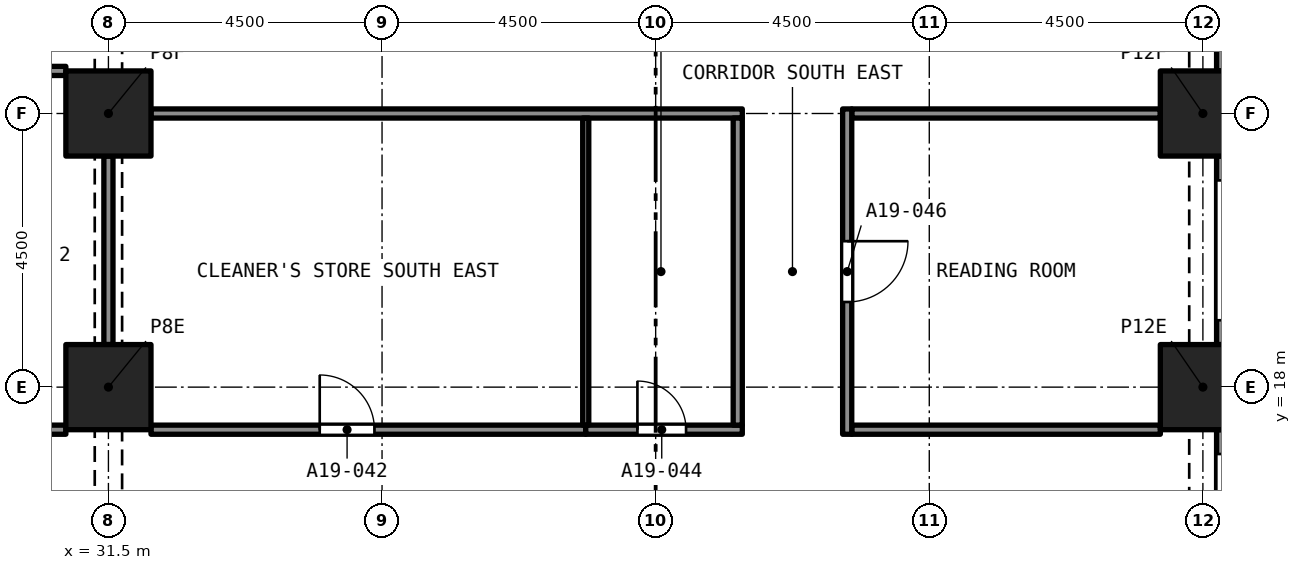
"""IFC4 building model, lengths in metres.
Left out: names, types, materials, properties, quantities, classifications, styles, units other than length and angle.
Written with IfcOpenShell. Run it as: python <this file> out.ifc"""

import sys

from ifc_helpers import new_model, si_unit, direction, frame, frame_2d, origin, origin_2d, place, context, subcontext, project, spatial, rectangle, extrude, element, fill, save


model = new_model("IFC4")
c1 = context("Model", 3, precision=1e-05, world=origin(), true_north=direction((0.0, 1.0)))
c2 = subcontext(c1, "Body", "Model", "MODEL_VIEW")
j1 = project(units=[si_unit("LENGTHUNIT", "METRE"), si_unit("PLANEANGLEUNIT", "RADIAN")], contexts=[c1])
p1 = place(None, origin())
s1 = spatial("IfcSite", under=j1, at=p1, CompositionType="ELEMENT")
p2 = place(p1, origin())
s2 = spatial("IfcBuilding", under=s1, at=p2, CompositionType="ELEMENT")
p3 = place(p2, frame((0.0, 0.0, 72.0)))
s3 = spatial("IfcBuildingStorey", under=s2, at=p3, CompositionType="ELEMENT", Elevation=72.0)
for number, where, z_axis, x_axis in (
    (1, (31.5, 18.0, 0.0), (0.0, 0.0, 1.0), (1.0, 0.0, 0.0)),
    (2, (49.5, 18.0, 0.0), (0.0, 0.0, 1.0), (1.0, 0.0, 0.0)),
    (3, (31.5, 22.5, 0.0), (0.0, 0.0, 1.0), (1.0, 0.0, 0.0)),
    (4, (49.5, 22.5, 0.0), (0.0, 0.0, 1.0), (1.0, 0.0, 0.0)),
):
    element("IfcColumn", number, at=place(p3, frame(where, z_axis=z_axis, x_axis=x_axis)), inside=s3, PredefinedType="COLUMN", context=c2, shape_type="SweptSolid", body=[
        extrude(rectangle(XDim=1.4, YDim=1.4, at=origin_2d()), origin(), (0.0, 0.0, 1.0), 3.2),
    ])
p4 = place(p3, frame((49.875, 17.3, 0.0), z_axis=(0.0, 0.0, 1.0), x_axis=(0.0, -1.0, 0.0)))
e5 = element("IfcWall", 5, at=p4, inside=s3, PredefinedType="SOLIDWALL", context=c2, shape_type="SweptSolid", body=[
    extrude(rectangle(XDim=3.1, YDim=0.3, at=frame_2d((1.55, 0.0))), origin(), (0.0, 0.0, 1.0), 3.2),
])
p5 = place(p4, frame((0.4, 0.0, 0.45)))
e6 = element("IfcOpeningElement", 6, at=p5, cuts=e5, PredefinedType="OPENING", context=c2, shape_type="SweptSolid", body=[
    extrude(rectangle(XDim=2.3, YDim=1.95, at=frame_2d((1.15, 0.975))), frame((0.0, 0.16, 0.0), z_axis=(0.0, -1.0, 0.0), x_axis=(1.0, 0.0, 0.0)), (0.0, 0.0, 1.0), 0.32),
])
p6 = place(p3, frame((49.875, 21.8, 0.0), z_axis=(0.0, 0.0, 1.0), x_axis=(0.0, -1.0, 0.0)))
e7 = element("IfcWall", 7, at=p6, inside=s3, PredefinedType="SOLIDWALL", context=c2, shape_type="SweptSolid", body=[
    extrude(rectangle(XDim=3.1, YDim=0.3, at=frame_2d((1.55, 0.0))), origin(), (0.0, 0.0, 1.0), 3.2),
])
p7 = place(p6, frame((0.4, 0.0, 0.45)))
e8 = element("IfcOpeningElement", 8, at=p7, cuts=e7, PredefinedType="OPENING", context=c2, shape_type="SweptSolid", body=[
    extrude(rectangle(XDim=2.3, YDim=1.95, at=frame_2d((1.15, 0.975))), frame((0.0, 0.16, 0.0), z_axis=(0.0, -1.0, 0.0), x_axis=(1.0, 0.0, 0.0)), (0.0, 0.0, 1.0), 0.32),
])
p8 = place(p3, frame((49.875, 26.3, 0.0), z_axis=(0.0, 0.0, 1.0), x_axis=(0.0, -1.0, 0.0)))
e9 = element("IfcWall", 9, at=p8, inside=s3, PredefinedType="SOLIDWALL", context=c2, shape_type="SweptSolid", body=[
    extrude(rectangle(XDim=3.1, YDim=0.3, at=frame_2d((1.55, 0.0))), origin(), (0.0, 0.0, 1.0), 3.2),
])
p9 = place(p8, frame((0.4, 0.0, 0.45)))
e10 = element("IfcOpeningElement", 10, at=p9, cuts=e9, PredefinedType="OPENING", context=c2, shape_type="SweptSolid", body=[
    extrude(rectangle(XDim=2.3, YDim=1.95, at=frame_2d((1.15, 0.975))), frame((0.0, 0.16, 0.0), z_axis=(0.0, -1.0, 0.0), x_axis=(1.0, 0.0, 0.0)), (0.0, 0.0, 1.0), 0.32),
])
p10 = place(p3, frame((25.725, 17.3, 0.0), z_axis=(0.0, 0.0, 1.0), x_axis=(1.0, 0.0, 0.0)))
e11 = element("IfcWall", 11, at=p10, inside=s3, PredefinedType="PARTITIONING", context=c2, shape_type="SweptSolid", body=[
    extrude(rectangle(XDim=5.075, YDim=0.15, at=frame_2d((2.538, 0.0))), origin(), (0.0, 0.0, 1.0), 2.7),
])
p11 = place(p3, frame((32.2, 17.3, 0.0), z_axis=(0.0, 0.0, 1.0), x_axis=(1.0, 0.0, 0.0)))
e12 = element("IfcWall", 12, at=p11, inside=s3, PredefinedType="PARTITIONING", context=c2, shape_type="SweptSolid", body=[
    extrude(rectangle(XDim=7.15, YDim=0.15, at=frame_2d((3.575, 0.0))), origin(), (0.0, 0.0, 1.0), 2.7),
])
p12 = place(p11, frame((2.775, 0.0, 0.0)))
e13 = element("IfcOpeningElement", 13, at=p12, cuts=e12, PredefinedType="OPENING", context=c2, shape_type="SweptSolid", body=[
    extrude(rectangle(XDim=0.9, YDim=2.1, at=frame_2d((0.45, 1.05))), frame((0.0, 0.085, 0.0), z_axis=(0.0, -1.0, 0.0), x_axis=(1.0, 0.0, 0.0)), (0.0, 0.0, 1.0), 0.17),
])
p13 = place(p3, frame((39.35, 17.3, 0.0), z_axis=(0.0, 0.0, 1.0), x_axis=(1.0, 0.0, 0.0)))
e14 = element("IfcWall", 14, at=p13, inside=s3, PredefinedType="PARTITIONING", context=c2, shape_type="SweptSolid", body=[
    extrude(rectangle(XDim=2.575, YDim=0.15, at=frame_2d((1.288, 0.0))), origin(), (0.0, 0.0, 1.0), 2.7),
])
p14 = place(p13, frame((0.85, 0.0, 0.0)))
e15 = element("IfcOpeningElement", 15, at=p14, cuts=e14, PredefinedType="OPENING", context=c2, shape_type="SweptSolid", body=[
    extrude(rectangle(XDim=0.8, YDim=2.1, at=frame_2d((0.4, 1.05))), frame((0.0, 0.085, 0.0), z_axis=(0.0, -1.0, 0.0), x_axis=(1.0, 0.0, 0.0)), (0.0, 0.0, 1.0), 0.17),
])
for number, where, z_axis, x_axis in (
    (16, (43.725, 17.3, 0.0), (0.0, 0.0, 1.0), (1.0, 0.0, 0.0)),
    (17, (25.725, 23.2, 0.0), (0.0, 0.0, 1.0), (1.0, 0.0, 0.0)),
):
    element("IfcWall", number, at=place(p3, frame(where, z_axis=z_axis, x_axis=x_axis)), inside=s3, PredefinedType="PARTITIONING", context=c2, shape_type="SweptSolid", body=[
        extrude(rectangle(XDim=5.075, YDim=0.15, at=frame_2d((2.538, 0.0))), origin(), (0.0, 0.0, 1.0), 2.7),
    ])
p15 = place(p3, frame((31.5, 18.7, 0.0), z_axis=(0.0, 0.0, 1.0), x_axis=(0.0, 1.0, 0.0)))
e18 = element("IfcWall", 18, at=p15, inside=s3, PredefinedType="PARTITIONING", context=c2, shape_type="SweptSolid", body=[
    extrude(rectangle(XDim=3.1, YDim=0.15, at=frame_2d((1.55, 0.0))), origin(), (0.0, 0.0, 1.0), 2.38),
])
p16 = place(p3, frame((32.2, 22.5, 0.0), z_axis=(0.0, 0.0, 1.0), x_axis=(1.0, 0.0, 0.0)))
e19 = element("IfcWall", 19, at=p16, inside=s3, PredefinedType="PARTITIONING", context=c2, shape_type="SweptSolid", body=[
    extrude(rectangle(XDim=9.725, YDim=0.15, at=frame_2d((4.863, 0.0))), origin(), (0.0, 0.0, 1.0), 2.7),
])
p17 = place(p3, frame((43.725, 22.5, 0.0), z_axis=(0.0, 0.0, 1.0), x_axis=(1.0, 0.0, 0.0)))
e20 = element("IfcWall", 20, at=p17, inside=s3, PredefinedType="PARTITIONING", context=c2, shape_type="SweptSolid", body=[
    extrude(rectangle(XDim=5.075, YDim=0.15, at=frame_2d((2.538, 0.0))), origin(), (0.0, 0.0, 1.0), 2.7),
])
p18 = place(p3, frame((41.85, 17.375, 0.0), z_axis=(0.0, 0.0, 1.0), x_axis=(0.0, 1.0, 0.0)))
e21 = element("IfcWall", 21, at=p18, inside=s3, PredefinedType="PARTITIONING", context=c2, shape_type="SweptSolid", body=[
    extrude(rectangle(XDim=5.05, YDim=0.15, at=frame_2d((2.525, 0.0))), origin(), (0.0, 0.0, 1.0), 2.7),
])
p19 = place(p3, frame((43.65, 22.575, 0.0), z_axis=(0.0, 0.0, 1.0), x_axis=(0.0, -1.0, 0.0)))
e22 = element("IfcWall", 22, at=p19, inside=s3, PredefinedType="PARTITIONING", context=c2, shape_type="SweptSolid", body=[
    extrude(rectangle(XDim=5.35, YDim=0.15, at=frame_2d((2.675, 0.0))), origin(), (0.0, 0.0, 1.0), 2.7),
])
p20 = place(p19, frame((2.175, 0.0, 0.0)))
e23 = element("IfcOpeningElement", 23, at=p20, cuts=e22, PredefinedType="OPENING", context=c2, shape_type="SweptSolid", body=[
    extrude(rectangle(XDim=1.0, YDim=2.1, at=frame_2d((0.5, 1.05))), frame((0.0, 0.085, 0.0), z_axis=(0.0, -1.0, 0.0), x_axis=(1.0, 0.0, 0.0)), (0.0, 0.0, 1.0), 0.17),
])
p21 = place(p3, frame((39.35, 17.375, 0.0), z_axis=(0.0, 0.0, 1.0), x_axis=(0.0, 1.0, 0.0)))
e24 = element("IfcWall", 24, at=p21, inside=s3, PredefinedType="PARTITIONING", context=c2, shape_type="SweptSolid", body=[
    extrude(rectangle(XDim=5.05, YDim=0.1, at=frame_2d((2.525, 0.0))), origin(), (0.0, 0.0, 1.0), 2.7),
])
p22 = place(p12, origin())
e25 = element("IfcDoor", 25, at=p22, inside=s3, OperationType="SINGLE_SWING_LEFT", PredefinedType="DOOR", context=c2, shape_type="SweptSolid", body=[
    extrude(rectangle(XDim=0.9, YDim=2.1, at=frame_2d((0.45, 1.05))), frame((0.0, 0.025, 0.0), z_axis=(0.0, -1.0, 0.0), x_axis=(1.0, 0.0, 0.0)), (0.0, 0.0, 1.0), 0.05),
])
fill(e13, e25)
p23 = place(p14, origin())
e26 = element("IfcDoor", 26, at=p23, inside=s3, OperationType="SINGLE_SWING_LEFT", PredefinedType="DOOR", context=c2, shape_type="SweptSolid", body=[
    extrude(rectangle(XDim=0.8, YDim=2.1, at=frame_2d((0.4, 1.05))), frame((0.0, 0.025, 0.0), z_axis=(0.0, -1.0, 0.0), x_axis=(1.0, 0.0, 0.0)), (0.0, 0.0, 1.0), 0.05),
])
fill(e15, e26)
p24 = place(p20, origin())
e27 = element("IfcDoor", 27, at=p24, inside=s3, OperationType="SINGLE_SWING_RIGHT", PredefinedType="DOOR", context=c2, shape_type="SweptSolid", body=[
    extrude(rectangle(XDim=1.0, YDim=2.1, at=frame_2d((0.5, 1.05))), frame((0.0, 0.025, 0.0), z_axis=(0.0, -1.0, 0.0), x_axis=(1.0, 0.0, 0.0)), (0.0, 0.0, 1.0), 0.05),
])
fill(e23, e27)
save(model, sys.argv[1])
